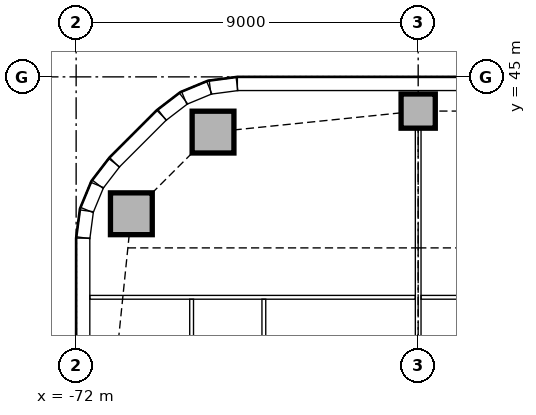
"""IFC4 building model, lengths in metres.
Left out: names, types, materials, properties, quantities, classifications, styles, units other than length and angle.
Written with IfcOpenShell. Run it as: python <this file> out.ifc"""

import sys

from ifc_helpers import new_model, si_unit, direction, frame, frame_2d, origin, origin_2d, place, context, subcontext, project, spatial, rectangle, extrude, element, fill, save


model = new_model("IFC4")
c1 = context("Model", 3, precision=1e-05, world=origin(), true_north=direction((0.0, 1.0)))
c2 = subcontext(c1, "Body", "Model", "MODEL_VIEW")
j1 = project(units=[si_unit("LENGTHUNIT", "METRE"), si_unit("PLANEANGLEUNIT", "RADIAN")], contexts=[c1])
p1 = place(None, origin())
s1 = spatial("IfcSite", under=j1, at=p1, CompositionType="ELEMENT")
p2 = place(p1, origin())
s2 = spatial("IfcBuilding", under=s1, at=p2, CompositionType="ELEMENT")
p3 = place(p2, frame((0.0, 0.0, 26.0)))
s3 = spatial("IfcBuildingStorey", under=s2, at=p3, CompositionType="ELEMENT", Elevation=26.0)
for number, where, z_axis, x_axis in (
    (1, (-68.398, 43.547, 0.0), (0.0, 0.0, 1.0), (1.0, 0.0, 0.0)),
    (2, (-70.547, 41.398, 0.0), (0.0, 0.0, 1.0), (1.0, 0.0, 0.0)),
):
    element("IfcColumn", number, at=place(p3, frame(where, z_axis=z_axis, x_axis=x_axis)), inside=s3, PredefinedType="COLUMN", context=c2, shape_type="SweptSolid", body=[
        extrude(rectangle(XDim=1.1, YDim=1.1, at=origin_2d()), origin(), (0.0, 0.0, 1.0), 3.85),
    ])
p4 = place(p3, frame((-63.0, 44.1, 0.0), z_axis=(0.0, 0.0, 1.0), x_axis=(1.0, 0.0, 0.0)))
e3 = element("IfcColumn", 3, at=p4, inside=s3, PredefinedType="COLUMN", context=c2, shape_type="SweptSolid", body=[
    extrude(rectangle(XDim=0.9, YDim=0.9, at=origin_2d()), origin(), (0.0, 0.0, 1.0), 3.85),
])
p5 = place(p3, frame((-31.243, 44.82, 0.0), z_axis=(0.0, 0.0, 1.0), x_axis=(-1.0, 0.0, 0.0)))
e4 = element("IfcWall", 4, at=p5, inside=s3, PredefinedType="STANDARD", context=c2, shape_type="SweptSolid", body=[
    extrude(rectangle(XDim=36.515, YDim=0.36, at=frame_2d((18.257, 0.0))), origin(), (0.0, 0.0, 1.0), 3.85),
])
p6 = place(p5, frame((3.107, 0.0, 0.9)))
e5 = element("IfcOpeningElement", 5, at=p6, cuts=e4, PredefinedType="OPENING", context=c2, shape_type="SweptSolid", body=[
    extrude(rectangle(XDim=3.3, YDim=1.6, at=frame_2d((1.65, 0.8))), frame((0.0, 0.19, 0.0), z_axis=(0.0, -1.0, 0.0), x_axis=(1.0, 0.0, 0.0)), (0.0, 0.0, 1.0), 0.38),
])
p7 = place(p5, frame((7.607, 0.0, 0.9)))
e6 = element("IfcOpeningElement", 6, at=p7, cuts=e4, PredefinedType="OPENING", context=c2, shape_type="SweptSolid", body=[
    extrude(rectangle(XDim=3.3, YDim=1.6, at=frame_2d((1.65, 0.8))), frame((0.0, 0.19, 0.0), z_axis=(0.0, -1.0, 0.0), x_axis=(1.0, 0.0, 0.0)), (0.0, 0.0, 1.0), 0.38),
])
p8 = place(p5, frame((12.107, 0.0, 0.9)))
e7 = element("IfcOpeningElement", 7, at=p8, cuts=e4, PredefinedType="OPENING", context=c2, shape_type="SweptSolid", body=[
    extrude(rectangle(XDim=3.3, YDim=1.6, at=frame_2d((1.65, 0.8))), frame((0.0, 0.19, 0.0), z_axis=(0.0, -1.0, 0.0), x_axis=(1.0, 0.0, 0.0)), (0.0, 0.0, 1.0), 0.38),
])
p9 = place(p5, frame((16.607, 0.0, 0.9)))
e8 = element("IfcOpeningElement", 8, at=p9, cuts=e4, PredefinedType="OPENING", context=c2, shape_type="SweptSolid", body=[
    extrude(rectangle(XDim=3.3, YDim=1.6, at=frame_2d((1.65, 0.8))), frame((0.0, 0.19, 0.0), z_axis=(0.0, -1.0, 0.0), x_axis=(1.0, 0.0, 0.0)), (0.0, 0.0, 1.0), 0.38),
])
p10 = place(p5, frame((21.107, 0.0, 0.9)))
e9 = element("IfcOpeningElement", 9, at=p10, cuts=e4, PredefinedType="OPENING", context=c2, shape_type="SweptSolid", body=[
    extrude(rectangle(XDim=3.3, YDim=1.6, at=frame_2d((1.65, 0.8))), frame((0.0, 0.19, 0.0), z_axis=(0.0, -1.0, 0.0), x_axis=(1.0, 0.0, 0.0)), (0.0, 0.0, 1.0), 0.38),
])
p11 = place(p5, frame((25.607, 0.0, 0.9)))
e10 = element("IfcOpeningElement", 10, at=p11, cuts=e4, PredefinedType="OPENING", context=c2, shape_type="SweptSolid", body=[
    extrude(rectangle(XDim=3.3, YDim=1.6, at=frame_2d((1.65, 0.8))), frame((0.0, 0.19, 0.0), z_axis=(0.0, -1.0, 0.0), x_axis=(1.0, 0.0, 0.0)), (0.0, 0.0, 1.0), 0.38),
])
p12 = place(p5, frame((30.107, 0.0, 0.9)))
e11 = element("IfcOpeningElement", 11, at=p12, cuts=e4, PredefinedType="OPENING", context=c2, shape_type="SweptSolid", body=[
    extrude(rectangle(XDim=3.3, YDim=1.6, at=frame_2d((1.65, 0.8))), frame((0.0, 0.19, 0.0), z_axis=(0.0, -1.0, 0.0), x_axis=(1.0, 0.0, 0.0)), (0.0, 0.0, 1.0), 0.38),
])
p13 = place(p3, frame((-69.751, 43.994, 0.0), z_axis=(0.0, 0.0, 1.0), x_axis=(-0.707106781187, -0.707106781187, 0.0)))
e12 = element("IfcWall", 12, at=p13, inside=s3, PredefinedType="STANDARD", context=c2, shape_type="SweptSolid", body=[
    extrude(rectangle(XDim=1.757, YDim=0.36, at=frame_2d((0.879, 0.0))), origin(), (0.0, 0.0, 1.0), 3.85),
])
p14 = place(p3, frame((-71.82, 40.757, 0.0), z_axis=(0.0, 0.0, 1.0), x_axis=(0.0, -1.0, 0.0)))
e13 = element("IfcWall", 13, at=p14, inside=s3, PredefinedType="STANDARD", context=c2, shape_type="SweptSolid", body=[
    extrude(rectangle(XDim=26.015, YDim=0.36, at=frame_2d((13.007, 0.0))), origin(), (0.0, 0.0, 1.0), 3.85),
])
p15 = place(p14, frame((2.357, 0.0, 0.9)))
e14 = element("IfcOpeningElement", 14, at=p15, cuts=e13, PredefinedType="OPENING", context=c2, shape_type="SweptSolid", body=[
    extrude(rectangle(XDim=3.3, YDim=1.6, at=frame_2d((1.65, 0.8))), frame((0.0, 0.19, 0.0), z_axis=(0.0, -1.0, 0.0), x_axis=(1.0, 0.0, 0.0)), (0.0, 0.0, 1.0), 0.38),
])
p16 = place(p14, frame((7.057, 0.0, 0.9)))
e15 = element("IfcOpeningElement", 15, at=p16, cuts=e13, PredefinedType="OPENING", context=c2, shape_type="SweptSolid", body=[
    extrude(rectangle(XDim=3.3, YDim=1.6, at=frame_2d((1.65, 0.8))), frame((0.0, 0.19, 0.0), z_axis=(0.0, -1.0, 0.0), x_axis=(1.0, 0.0, 0.0)), (0.0, 0.0, 1.0), 0.38),
])
p17 = place(p14, frame((11.357, 0.0, 0.9)))
e16 = element("IfcOpeningElement", 16, at=p17, cuts=e13, PredefinedType="OPENING", context=c2, shape_type="SweptSolid", body=[
    extrude(rectangle(XDim=3.3, YDim=1.6, at=frame_2d((1.65, 0.8))), frame((0.0, 0.19, 0.0), z_axis=(0.0, -1.0, 0.0), x_axis=(1.0, 0.0, 0.0)), (0.0, 0.0, 1.0), 0.38),
])
p18 = place(p14, frame((15.857, 0.0, 0.9)))
e17 = element("IfcOpeningElement", 17, at=p18, cuts=e13, PredefinedType="OPENING", context=c2, shape_type="SweptSolid", body=[
    extrude(rectangle(XDim=3.3, YDim=1.6, at=frame_2d((1.65, 0.8))), frame((0.0, 0.19, 0.0), z_axis=(0.0, -1.0, 0.0), x_axis=(1.0, 0.0, 0.0)), (0.0, 0.0, 1.0), 0.38),
])
p19 = place(p14, frame((20.957, 0.0, 0.9)))
e18 = element("IfcOpeningElement", 18, at=p19, cuts=e13, PredefinedType="OPENING", context=c2, shape_type="SweptSolid", body=[
    extrude(rectangle(XDim=3.3, YDim=1.6, at=frame_2d((1.65, 0.8))), frame((0.0, 0.19, 0.0), z_axis=(0.0, -1.0, 0.0), x_axis=(1.0, 0.0, 0.0)), (0.0, 0.0, 1.0), 0.38),
])
for number, where, z_axis, x_axis in (
    (19, (-67.769, 44.817, 0.0), (0.0, 0.0, 1.0), (-0.991, -0.131, 0.0)),
    (20, (-68.497, 44.718, 0.0), (0.0, 0.0, 1.0), (-0.924, -0.383, 0.0)),
):
    element("IfcWall", number, at=place(p3, frame(where, z_axis=z_axis, x_axis=x_axis)), inside=s3, PredefinedType="STANDARD", context=c2, shape_type="SweptSolid", body=[
        extrude(rectangle(XDim=0.713, YDim=0.36, at=frame_2d((0.356, 0.0))), origin(), (0.0, 0.0, 1.0), 3.85),
    ])
for number, where, z_axis, x_axis in (
    (21, (-69.175, 44.434, 0.0), (0.0, 0.0, 1.0), (-0.793, -0.609, 0.0)),
    (22, (-71.0, 42.741, 0.0), (0.0, 0.0, 1.0), (-0.609, -0.793, 0.0)),
):
    element("IfcWall", number, at=place(p3, frame(where, z_axis=z_axis, x_axis=x_axis)), inside=s3, PredefinedType="STANDARD", context=c2, shape_type="SweptSolid", body=[
        extrude(rectangle(XDim=0.713, YDim=0.36, at=frame_2d((0.357, 0.0))), origin(), (0.0, 0.0, 1.0), 3.85),
    ])
for number, where, z_axis, x_axis in (
    (23, (-71.445, 42.156, 0.0), (0.0, 0.0, 1.0), (-0.383, -0.924, 0.0)),
    (24, (-71.724, 41.476, 0.0), (0.0, 0.0, 1.0), (-0.131, -0.991, 0.0)),
):
    element("IfcWall", number, at=place(p3, frame(where, z_axis=z_axis, x_axis=x_axis)), inside=s3, PredefinedType="STANDARD", context=c2, shape_type="SweptSolid", body=[
        extrude(rectangle(XDim=0.713, YDim=0.36, at=frame_2d((0.356, 0.0))), origin(), (0.0, 0.0, 1.0), 3.85),
    ])
p20 = place(p3, frame((-63.0, 36.4, 0.0), z_axis=(0.0, 0.0, 1.0), x_axis=(0.0, 1.0, 0.0)))
e25 = element("IfcWall", 25, at=p20, inside=s3, PredefinedType="PARTITIONING", context=c2, shape_type="SweptSolid", body=[
    extrude(rectangle(XDim=7.25, YDim=0.15, at=frame_2d((3.625, 0.0))), origin(), (0.0, 0.0, 1.0), 3.158),
])
p21 = place(p3, frame((-62.925, 39.2, 0.0), z_axis=(0.0, 0.0, 1.0), x_axis=(1.0, 0.0, 0.0)))
e26 = element("IfcWall", 26, at=p21, inside=s3, PredefinedType="PARTITIONING", context=c2, shape_type="SweptSolid", body=[
    extrude(rectangle(XDim=8.85, YDim=0.1, at=frame_2d((4.425, 0.0))), origin(), (0.0, 0.0, 1.0), 3.85),
])
p22 = place(p21, frame((3.265, 0.0, 0.0)))
e27 = element("IfcOpeningElement", 27, at=p22, cuts=e26, PredefinedType="OPENING", context=c2, shape_type="SweptSolid", body=[
    extrude(rectangle(XDim=0.9, YDim=2.1, at=frame_2d((0.45, 1.05))), frame((0.0, 0.06, 0.0), z_axis=(0.0, -1.0, 0.0), x_axis=(1.0, 0.0, 0.0)), (0.0, 0.0, 1.0), 0.12),
])
p23 = place(p3, frame((-71.64, 39.2, 0.0), z_axis=(0.0, 0.0, 1.0), x_axis=(1.0, 0.0, 0.0)))
e28 = element("IfcWall", 28, at=p23, inside=s3, PredefinedType="PARTITIONING", context=c2, shape_type="SweptSolid", body=[
    extrude(rectangle(XDim=8.565, YDim=0.1, at=frame_2d((4.282, 0.0))), origin(), (0.0, 0.0, 1.0), 3.85),
])
p24 = place(p23, frame((3.178, 0.0, 0.0)))
e29 = element("IfcOpeningElement", 29, at=p24, cuts=e28, PredefinedType="OPENING", context=c2, shape_type="SweptSolid", body=[
    extrude(rectangle(XDim=0.9, YDim=2.1, at=frame_2d((0.45, 1.05))), frame((0.0, 0.06, 0.0), z_axis=(0.0, -1.0, 0.0), x_axis=(1.0, 0.0, 0.0)), (0.0, 0.0, 1.0), 0.12),
])
p25 = place(p3, frame((-68.962, 36.075, 0.0), z_axis=(0.0, 0.0, 1.0), x_axis=(0.0, 1.0, 0.0)))
e30 = element("IfcWall", 30, at=p25, inside=s3, PredefinedType="PARTITIONING", context=c2, shape_type="SweptSolid", body=[
    extrude(rectangle(XDim=3.075, YDim=0.1, at=frame_2d((1.538, 0.0))), origin(), (0.0, 0.0, 1.0), 3.85),
])
p26 = place(p25, frame((1.1, 0.0, 0.0)))
e31 = element("IfcOpeningElement", 31, at=p26, cuts=e30, PredefinedType="OPENING", context=c2, shape_type="SweptSolid", body=[
    extrude(rectangle(XDim=0.9, YDim=2.1, at=frame_2d((0.45, 1.05))), frame((0.0, 0.06, 0.0), z_axis=(0.0, -1.0, 0.0), x_axis=(1.0, 0.0, 0.0)), (0.0, 0.0, 1.0), 0.12),
])
p27 = place(p3, frame((-67.061, 36.075, 0.0), z_axis=(0.0, 0.0, 1.0), x_axis=(0.0, 1.0, 0.0)))
e32 = element("IfcWall", 32, at=p27, inside=s3, PredefinedType="PARTITIONING", context=c2, shape_type="SweptSolid", body=[
    extrude(rectangle(XDim=3.075, YDim=0.1, at=frame_2d((1.538, 0.0))), origin(), (0.0, 0.0, 1.0), 3.85),
])
p28 = place(p27, frame((1.1, 0.0, 0.0)))
e33 = element("IfcOpeningElement", 33, at=p28, cuts=e32, PredefinedType="OPENING", context=c2, shape_type="SweptSolid", body=[
    extrude(rectangle(XDim=0.9, YDim=2.1, at=frame_2d((0.45, 1.05))), frame((0.0, 0.06, 0.0), z_axis=(0.0, -1.0, 0.0), x_axis=(1.0, 0.0, 0.0)), (0.0, 0.0, 1.0), 0.12),
])
p29 = place(p12, origin())
e34 = element("IfcWindow", 34, at=p29, inside=s3, PartitioningType="SINGLE_PANEL", PredefinedType="WINDOW", context=c2, shape_type="SweptSolid", body=[
    extrude(rectangle(XDim=3.3, YDim=1.6, at=frame_2d((1.65, 0.8))), frame((0.0, 0.13, 0.0), z_axis=(0.0, -1.0, 0.0), x_axis=(1.0, 0.0, 0.0)), (0.0, 0.0, 1.0), 0.06),
])
fill(e11, e34)
p30 = place(p15, origin())
e35 = element("IfcWindow", 35, at=p30, inside=s3, PartitioningType="SINGLE_PANEL", PredefinedType="WINDOW", context=c2, shape_type="SweptSolid", body=[
    extrude(rectangle(XDim=3.3, YDim=1.6, at=frame_2d((1.65, 0.8))), frame((0.0, 0.13, 0.0), z_axis=(0.0, -1.0, 0.0), x_axis=(1.0, 0.0, 0.0)), (0.0, 0.0, 1.0), 0.06),
])
fill(e14, e35)
p31 = place(p24, frame((0.9, 0.0, 0.0), z_axis=(0.0, 0.0, 1.0), x_axis=(-1.0, 0.0, 0.0)))
e36 = element("IfcDoor", 36, at=p31, inside=s3, OperationType="SINGLE_SWING_RIGHT", PredefinedType="DOOR", context=c2, shape_type="SweptSolid", body=[
    extrude(rectangle(XDim=0.9, YDim=2.1, at=frame_2d((0.45, 1.05))), frame((0.0, 0.025, 0.0), z_axis=(0.0, -1.0, 0.0), x_axis=(1.0, 0.0, 0.0)), (0.0, 0.0, 1.0), 0.05),
])
fill(e29, e36)
save(model, sys.argv[1])
